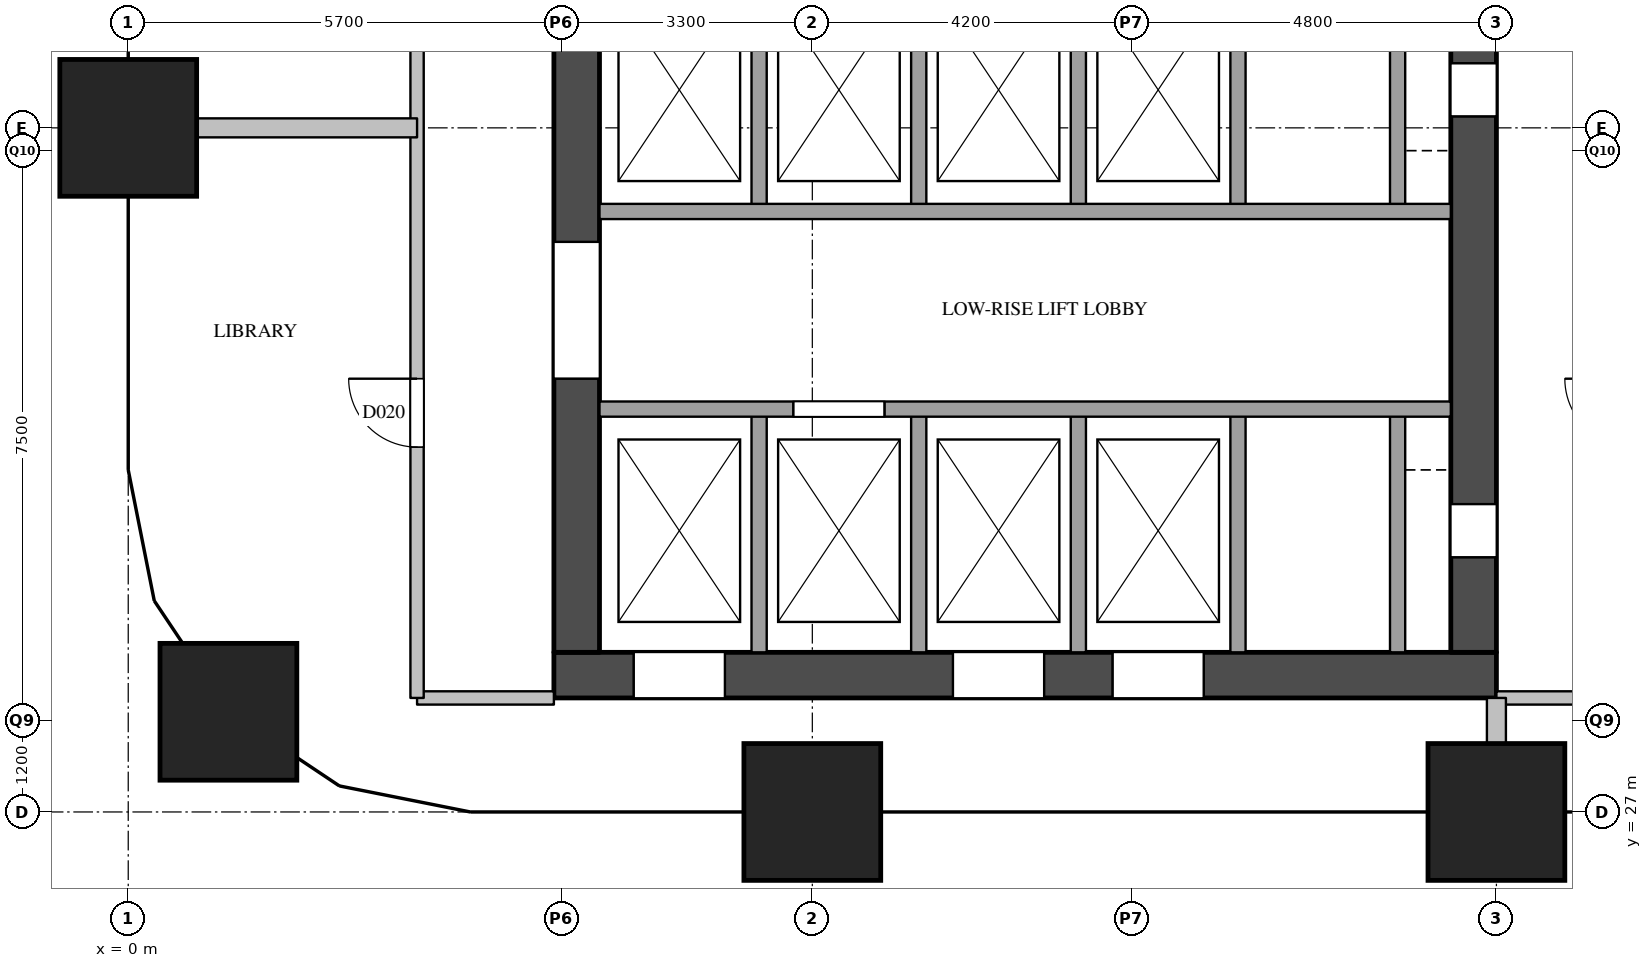
"""IFC4 building model, lengths in metres.
Left out: names, types, materials, properties, quantities, classifications, styles, units other than length and angle.
Written with IfcOpenShell. Run it as: python <this file> out.ifc"""

import sys

from ifc_helpers import new_model, si_unit, direction, frame, frame_2d, origin, origin_2d, place, context, subcontext, project, spatial, rectangle, extrude, element, fill, save


model = new_model("IFC4")
c1 = context("Model", 3, precision=1e-05, world=origin(), true_north=direction((0.0, 1.0)))
c2 = subcontext(c1, "Body", "Model", "MODEL_VIEW")
j1 = project(units=[si_unit("LENGTHUNIT", "METRE"), si_unit("PLANEANGLEUNIT", "RADIAN")], contexts=[c1])
p1 = place(None, origin())
s1 = spatial("IfcSite", under=j1, at=p1, CompositionType="ELEMENT")
p2 = place(p1, origin())
s2 = spatial("IfcBuilding", under=s1, at=p2, CompositionType="ELEMENT")
p3 = place(p2, frame((0.0, 0.0, 104.4)))
s3 = spatial("IfcBuildingStorey", under=s2, at=p3, CompositionType="ELEMENT", Elevation=104.4)
for number, where, z_axis, x_axis in (
    (1, (1.318, 28.318, 0.0), (0.0, 0.0, 1.0), (1.0, 0.0, 0.0)),
    (2, (0.0, 36.0, 0.0), (0.0, 0.0, 1.0), (1.0, 0.0, 0.0)),
    (3, (9.0, 27.0, 0.0), (0.0, 0.0, 1.0), (1.0, 0.0, 0.0)),
    (4, (18.0, 27.0, 0.0), (0.0, 0.0, 1.0), (1.0, 0.0, 0.0)),
):
    element("IfcColumn", number, at=place(p3, frame(where, z_axis=z_axis, x_axis=x_axis)), inside=s3, PredefinedType="COLUMN", context=c2, shape_type="SweptSolid", body=[
        extrude(rectangle(XDim=1.8, YDim=1.8, at=origin_2d()), origin(), (0.0, 0.0, 1.0), 3.8),
    ])
p4 = place(p3, frame((5.6, 28.8, 0.0), z_axis=(0.0, 0.0, 1.0), x_axis=(1.0, 0.0, 0.0)))
e5 = element("IfcWall", 5, at=p4, inside=s3, PredefinedType="SHEAR", context=c2, shape_type="SweptSolid", body=[
    extrude(rectangle(XDim=12.4, YDim=0.6, at=frame_2d((6.2, 0.0))), origin(), (0.0, 0.0, 1.0), 3.5),
])
p5 = place(p4, frame((1.05, 0.0, 0.0)))
e6 = element("IfcOpeningElement", 6, at=p5, cuts=e5, PredefinedType="OPENING", context=c2, shape_type="SweptSolid", body=[
    extrude(rectangle(XDim=1.2, YDim=2.1, at=frame_2d((0.6, 1.05))), frame((0.0, 0.31, 0.0), z_axis=(0.0, -1.0, 0.0), x_axis=(1.0, 0.0, 0.0)), (0.0, 0.0, 1.0), 0.62),
])
p6 = place(p4, frame((5.25, 0.0, 0.0)))
e7 = element("IfcOpeningElement", 7, at=p6, cuts=e5, PredefinedType="OPENING", context=c2, shape_type="SweptSolid", body=[
    extrude(rectangle(XDim=1.2, YDim=2.1, at=frame_2d((0.6, 1.05))), frame((0.0, 0.31, 0.0), z_axis=(0.0, -1.0, 0.0), x_axis=(1.0, 0.0, 0.0)), (0.0, 0.0, 1.0), 0.62),
])
p7 = place(p4, frame((7.35, 0.0, 0.0)))
e8 = element("IfcOpeningElement", 8, at=p7, cuts=e5, PredefinedType="OPENING", context=c2, shape_type="SweptSolid", body=[
    extrude(rectangle(XDim=1.2, YDim=2.1, at=frame_2d((0.6, 1.05))), frame((0.0, 0.31, 0.0), z_axis=(0.0, -1.0, 0.0), x_axis=(1.0, 0.0, 0.0)), (0.0, 0.0, 1.0), 0.62),
])
p8 = place(p3, frame((5.9, 29.1, 0.0), z_axis=(0.0, 0.0, 1.0), x_axis=(0.0, 1.0, 0.0)))
e9 = element("IfcWall", 9, at=p8, inside=s3, PredefinedType="SHEAR", context=c2, shape_type="SweptSolid", body=[
    extrude(rectangle(XDim=20.3, YDim=0.6, at=frame_2d((10.15, 0.0))), origin(), (0.0, 0.0, 1.0), 3.5),
])
p9 = place(p8, frame((3.6, 0.0, 0.0)))
e10 = element("IfcOpeningElement", 10, at=p9, cuts=e9, PredefinedType="OPENING", context=c2, shape_type="SweptSolid", body=[
    extrude(rectangle(XDim=1.8, YDim=2.1, at=frame_2d((0.9, 1.05))), frame((0.0, 0.31, 0.0), z_axis=(0.0, -1.0, 0.0), x_axis=(1.0, 0.0, 0.0)), (0.0, 0.0, 1.0), 0.62),
])
p10 = place(p8, frame((16.4, 0.0, 0.0)))
e11 = element("IfcOpeningElement", 11, at=p10, cuts=e9, PredefinedType="OPENING", context=c2, shape_type="SweptSolid", body=[
    extrude(rectangle(XDim=1.0, YDim=2.1, at=frame_2d((0.5, 1.05))), frame((0.0, 0.31, 0.0), z_axis=(0.0, -1.0, 0.0), x_axis=(1.0, 0.0, 0.0)), (0.0, 0.0, 1.0), 0.62),
])
p11 = place(p3, frame((17.7, 29.1, 0.0), z_axis=(0.0, 0.0, 1.0), x_axis=(0.0, 1.0, 0.0)))
e12 = element("IfcWall", 12, at=p11, inside=s3, PredefinedType="SHEAR", context=c2, shape_type="SweptSolid", body=[
    extrude(rectangle(XDim=20.3, YDim=0.6, at=frame_2d((10.15, 0.0))), origin(), (0.0, 0.0, 1.0), 3.5),
])
p12 = place(p11, frame((1.25, 0.0, 0.0)))
e13 = element("IfcOpeningElement", 13, at=p12, cuts=e12, PredefinedType="OPENING", context=c2, shape_type="SweptSolid", body=[
    extrude(rectangle(XDim=0.7, YDim=2.1, at=frame_2d((0.35, 1.05))), frame((0.0, 0.31, 0.0), z_axis=(0.0, -1.0, 0.0), x_axis=(1.0, 0.0, 0.0)), (0.0, 0.0, 1.0), 0.62),
])
p13 = place(p11, frame((7.05, 0.0, 0.0)))
e14 = element("IfcOpeningElement", 14, at=p13, cuts=e12, PredefinedType="OPENING", context=c2, shape_type="SweptSolid", body=[
    extrude(rectangle(XDim=0.7, YDim=2.1, at=frame_2d((0.35, 1.05))), frame((0.0, 0.31, 0.0), z_axis=(0.0, -1.0, 0.0), x_axis=(1.0, 0.0, 0.0)), (0.0, 0.0, 1.0), 0.62),
])
p14 = place(p3, frame((8.3, 29.1, 0.0), z_axis=(0.0, 0.0, 1.0), x_axis=(0.0, 1.0, 0.0)))
e15 = element("IfcWall", 15, at=p14, inside=s3, PredefinedType="SOLIDWALL", context=c2, shape_type="SweptSolid", body=[
    extrude(rectangle(XDim=3.2, YDim=0.2, at=frame_2d((1.6, 0.0))), origin(), (0.0, 0.0, 1.0), 3.5),
])
p15 = place(p3, frame((8.3, 34.9, 0.0), z_axis=(0.0, 0.0, 1.0), x_axis=(0.0, 1.0, 0.0)))
e16 = element("IfcWall", 16, at=p15, inside=s3, PredefinedType="SOLIDWALL", context=c2, shape_type="SweptSolid", body=[
    extrude(rectangle(XDim=3.2, YDim=0.2, at=frame_2d((1.6, 0.0))), origin(), (0.0, 0.0, 1.0), 3.5),
])
p16 = place(p3, frame((10.4, 29.1, 0.0), z_axis=(0.0, 0.0, 1.0), x_axis=(0.0, 1.0, 0.0)))
e17 = element("IfcWall", 17, at=p16, inside=s3, PredefinedType="SOLIDWALL", context=c2, shape_type="SweptSolid", body=[
    extrude(rectangle(XDim=3.2, YDim=0.2, at=frame_2d((1.6, 0.0))), origin(), (0.0, 0.0, 1.0), 3.5),
])
p17 = place(p3, frame((10.4, 34.9, 0.0), z_axis=(0.0, 0.0, 1.0), x_axis=(0.0, 1.0, 0.0)))
e18 = element("IfcWall", 18, at=p17, inside=s3, PredefinedType="SOLIDWALL", context=c2, shape_type="SweptSolid", body=[
    extrude(rectangle(XDim=3.2, YDim=0.2, at=frame_2d((1.6, 0.0))), origin(), (0.0, 0.0, 1.0), 3.5),
])
p18 = place(p3, frame((12.5, 29.1, 0.0), z_axis=(0.0, 0.0, 1.0), x_axis=(0.0, 1.0, 0.0)))
e19 = element("IfcWall", 19, at=p18, inside=s3, PredefinedType="SOLIDWALL", context=c2, shape_type="SweptSolid", body=[
    extrude(rectangle(XDim=3.2, YDim=0.2, at=frame_2d((1.6, 0.0))), origin(), (0.0, 0.0, 1.0), 3.5),
])
p19 = place(p3, frame((12.5, 34.9, 0.0), z_axis=(0.0, 0.0, 1.0), x_axis=(0.0, 1.0, 0.0)))
e20 = element("IfcWall", 20, at=p19, inside=s3, PredefinedType="SOLIDWALL", context=c2, shape_type="SweptSolid", body=[
    extrude(rectangle(XDim=3.2, YDim=0.2, at=frame_2d((1.6, 0.0))), origin(), (0.0, 0.0, 1.0), 3.5),
])
p20 = place(p3, frame((14.6, 29.1, 0.0), z_axis=(0.0, 0.0, 1.0), x_axis=(0.0, 1.0, 0.0)))
e21 = element("IfcWall", 21, at=p20, inside=s3, PredefinedType="SOLIDWALL", context=c2, shape_type="SweptSolid", body=[
    extrude(rectangle(XDim=3.2, YDim=0.2, at=frame_2d((1.6, 0.0))), origin(), (0.0, 0.0, 1.0), 3.5),
])
p21 = place(p3, frame((14.6, 34.9, 0.0), z_axis=(0.0, 0.0, 1.0), x_axis=(0.0, 1.0, 0.0)))
e22 = element("IfcWall", 22, at=p21, inside=s3, PredefinedType="SOLIDWALL", context=c2, shape_type="SweptSolid", body=[
    extrude(rectangle(XDim=3.2, YDim=0.2, at=frame_2d((1.6, 0.0))), origin(), (0.0, 0.0, 1.0), 3.5),
])
p22 = place(p3, frame((16.7, 29.1, 0.0), z_axis=(0.0, 0.0, 1.0), x_axis=(0.0, 1.0, 0.0)))
e23 = element("IfcWall", 23, at=p22, inside=s3, PredefinedType="SOLIDWALL", context=c2, shape_type="SweptSolid", body=[
    extrude(rectangle(XDim=3.2, YDim=0.2, at=frame_2d((1.6, 0.0))), origin(), (0.0, 0.0, 1.0), 3.5),
])
p23 = place(p3, frame((16.7, 34.9, 0.0), z_axis=(0.0, 0.0, 1.0), x_axis=(0.0, 1.0, 0.0)))
e24 = element("IfcWall", 24, at=p23, inside=s3, PredefinedType="SOLIDWALL", context=c2, shape_type="SweptSolid", body=[
    extrude(rectangle(XDim=3.2, YDim=0.2, at=frame_2d((1.6, 0.0))), origin(), (0.0, 0.0, 1.0), 3.5),
])
p24 = place(p3, frame((6.2, 32.3, 0.0), z_axis=(0.0, 0.0, 1.0), x_axis=(1.0, 0.0, 0.0)))
e25 = element("IfcWall", 25, at=p24, inside=s3, PredefinedType="SOLIDWALL", context=c2, shape_type="SweptSolid", body=[
    extrude(rectangle(XDim=11.2, YDim=0.2, at=frame_2d((5.6, 0.0))), origin(), (0.0, 0.0, 1.0), 3.5),
])
p25 = place(p24, frame((2.55, 0.0, 0.0)))
e26 = element("IfcOpeningElement", 26, at=p25, cuts=e25, PredefinedType="OPENING", context=c2, shape_type="SweptSolid", body=[
    extrude(rectangle(XDim=1.2, YDim=2.1, at=frame_2d((0.6, 1.05))), frame((0.0, 0.11, 0.0), z_axis=(0.0, -1.0, 0.0), x_axis=(1.0, 0.0, 0.0)), (0.0, 0.0, 1.0), 0.22),
])
p26 = place(p3, frame((6.2, 34.9, 0.0), z_axis=(0.0, 0.0, 1.0), x_axis=(1.0, 0.0, 0.0)))
e27 = element("IfcWall", 27, at=p26, inside=s3, PredefinedType="SOLIDWALL", context=c2, shape_type="SweptSolid", body=[
    extrude(rectangle(XDim=11.2, YDim=0.2, at=frame_2d((5.6, 0.0))), origin(), (0.0, 0.0, 1.0), 3.5),
])
for number, where, z_axis, x_axis in (
    (28, (3.8, 28.5, 0.0), (0.0, 0.0, 1.0), (1.0, 0.0, 0.0)),
    (29, (18.0, 28.5, 0.0), (0.0, 0.0, 1.0), (1.0, 0.0, 0.0)),
):
    element("IfcWall", number, at=place(p3, frame(where, z_axis=z_axis, x_axis=x_axis)), inside=s3, PredefinedType="PARTITIONING", context=c2, shape_type="SweptSolid", body=[
        extrude(rectangle(XDim=1.8, YDim=0.175, at=frame_2d((0.9, 0.0))), origin(), (0.0, 0.0, 1.0), 3.5),
    ])
p27 = place(p3, frame((3.8, 28.5, 0.0), z_axis=(0.0, 0.0, 1.0), x_axis=(0.0, 1.0, 0.0)))
e30 = element("IfcWall", 30, at=p27, inside=s3, PredefinedType="PARTITIONING", context=c2, shape_type="SweptSolid", body=[
    extrude(rectangle(XDim=23.3, YDim=0.175, at=frame_2d((11.65, 0.0))), origin(), (0.0, 0.0, 1.0), 3.5),
])
p28 = place(p27, frame((3.3, 0.0, 0.0)))
e31 = element("IfcOpeningElement", 31, at=p28, cuts=e30, PredefinedType="OPENING", context=c2, shape_type="SweptSolid", body=[
    extrude(rectangle(XDim=0.9, YDim=2.1, at=frame_2d((0.45, 1.05))), frame((0.0, 0.097, 0.0), z_axis=(0.0, -1.0, 0.0), x_axis=(1.0, 0.0, 0.0)), (0.0, 0.0, 1.0), 0.195),
])
p29 = place(p27, frame((11.55, 0.0, 0.0)))
e32 = element("IfcOpeningElement", 32, at=p29, cuts=e30, PredefinedType="OPENING", context=c2, shape_type="SweptSolid", body=[
    extrude(rectangle(XDim=0.9, YDim=2.1, at=frame_2d((0.45, 1.05))), frame((0.0, 0.097, 0.0), z_axis=(0.0, -1.0, 0.0), x_axis=(1.0, 0.0, 0.0)), (0.0, 0.0, 1.0), 0.195),
])
p30 = place(p27, frame((19.45, 0.0, 0.0)))
e33 = element("IfcOpeningElement", 33, at=p30, cuts=e30, PredefinedType="OPENING", context=c2, shape_type="SweptSolid", body=[
    extrude(rectangle(XDim=0.9, YDim=2.1, at=frame_2d((0.45, 1.05))), frame((0.0, 0.097, 0.0), z_axis=(0.0, -1.0, 0.0), x_axis=(1.0, 0.0, 0.0)), (0.0, 0.0, 1.0), 0.195),
])
p31 = place(p3, frame((0.0, 36.0, 0.0), z_axis=(0.0, 0.0, 1.0), x_axis=(1.0, 0.0, 0.0)))
e34 = element("IfcWall", 34, at=p31, inside=s3, PredefinedType="PARTITIONING", context=c2, shape_type="SweptSolid", body=[
    extrude(rectangle(XDim=3.8, YDim=0.25, at=frame_2d((1.9, 0.0))), origin(), (0.0, 0.0, 1.0), 3.5),
])
p32 = place(p3, frame((18.0, 27.0, 0.0), z_axis=(0.0, 0.0, 1.0), x_axis=(0.0, 1.0, 0.0)))
e35 = element("IfcWall", 35, at=p32, inside=s3, PredefinedType="PARTITIONING", context=c2, shape_type="SweptSolid", body=[
    extrude(rectangle(XDim=1.5, YDim=0.25, at=frame_2d((0.75, 0.0))), origin(), (0.0, 0.0, 1.0), 3.5),
])
p33 = place(p5, origin())
e36 = element("IfcDoor", 36, at=p33, inside=s3, OperationType="SLIDING_TO_LEFT", PredefinedType="DOOR", context=c2, shape_type="SweptSolid", body=[
    extrude(rectangle(XDim=1.2, YDim=2.1, at=frame_2d((0.6, 1.05))), frame((0.0, 0.025, 0.0), z_axis=(0.0, -1.0, 0.0), x_axis=(1.0, 0.0, 0.0)), (0.0, 0.0, 1.0), 0.05),
])
fill(e6, e36)
p34 = place(p25, origin())
e37 = element("IfcDoor", 37, at=p34, inside=s3, OperationType="SLIDING_TO_LEFT", PredefinedType="DOOR", context=c2, shape_type="SweptSolid", body=[
    extrude(rectangle(XDim=1.2, YDim=2.1, at=frame_2d((0.6, 1.05))), frame((0.0, 0.025, 0.0), z_axis=(0.0, -1.0, 0.0), x_axis=(1.0, 0.0, 0.0)), (0.0, 0.0, 1.0), 0.05),
])
fill(e26, e37)
p35 = place(p6, origin())
e38 = element("IfcDoor", 38, at=p35, inside=s3, OperationType="SLIDING_TO_LEFT", PredefinedType="DOOR", context=c2, shape_type="SweptSolid", body=[
    extrude(rectangle(XDim=1.2, YDim=2.1, at=frame_2d((0.6, 1.05))), frame((0.0, 0.025, 0.0), z_axis=(0.0, -1.0, 0.0), x_axis=(1.0, 0.0, 0.0)), (0.0, 0.0, 1.0), 0.05),
])
fill(e7, e38)
p36 = place(p7, origin())
e39 = element("IfcDoor", 39, at=p36, inside=s3, OperationType="SLIDING_TO_LEFT", PredefinedType="DOOR", context=c2, shape_type="SweptSolid", body=[
    extrude(rectangle(XDim=1.2, YDim=2.1, at=frame_2d((0.6, 1.05))), frame((0.0, 0.025, 0.0), z_axis=(0.0, -1.0, 0.0), x_axis=(1.0, 0.0, 0.0)), (0.0, 0.0, 1.0), 0.05),
])
fill(e8, e39)
p37 = place(p12, origin())
e40 = element("IfcDoor", 40, at=p37, inside=s3, OperationType="SINGLE_SWING_LEFT", PredefinedType="DOOR", context=c2, shape_type="SweptSolid", body=[
    extrude(rectangle(XDim=0.7, YDim=2.1, at=frame_2d((0.35, 1.05))), frame((0.0, 0.025, 0.0), z_axis=(0.0, -1.0, 0.0), x_axis=(1.0, 0.0, 0.0)), (0.0, 0.0, 1.0), 0.05),
])
fill(e13, e40)
p38 = place(p13, origin())
e41 = element("IfcDoor", 41, at=p38, inside=s3, OperationType="SINGLE_SWING_LEFT", PredefinedType="DOOR", context=c2, shape_type="SweptSolid", body=[
    extrude(rectangle(XDim=0.7, YDim=2.1, at=frame_2d((0.35, 1.05))), frame((0.0, 0.025, 0.0), z_axis=(0.0, -1.0, 0.0), x_axis=(1.0, 0.0, 0.0)), (0.0, 0.0, 1.0), 0.05),
])
fill(e14, e41)
p39 = place(p9, origin())
e42 = element("IfcDoor", 42, at=p39, inside=s3, OperationType="DOUBLE_DOOR_SINGLE_SWING", PredefinedType="DOOR", context=c2, shape_type="SweptSolid", body=[
    extrude(rectangle(XDim=1.8, YDim=2.1, at=frame_2d((0.9, 1.05))), frame((0.0, 0.025, 0.0), z_axis=(0.0, -1.0, 0.0), x_axis=(1.0, 0.0, 0.0)), (0.0, 0.0, 1.0), 0.05),
])
fill(e10, e42)
p40 = place(p28, origin())
e43 = element("IfcDoor", 43, at=p40, inside=s3, OperationType="SINGLE_SWING_RIGHT", PredefinedType="DOOR", context=c2, shape_type="SweptSolid", body=[
    extrude(rectangle(XDim=0.9, YDim=2.1, at=frame_2d((0.45, 1.05))), frame((0.0, 0.025, 0.0), z_axis=(0.0, -1.0, 0.0), x_axis=(1.0, 0.0, 0.0)), (0.0, 0.0, 1.0), 0.05),
])
fill(e31, e43)
save(model, sys.argv[1])
